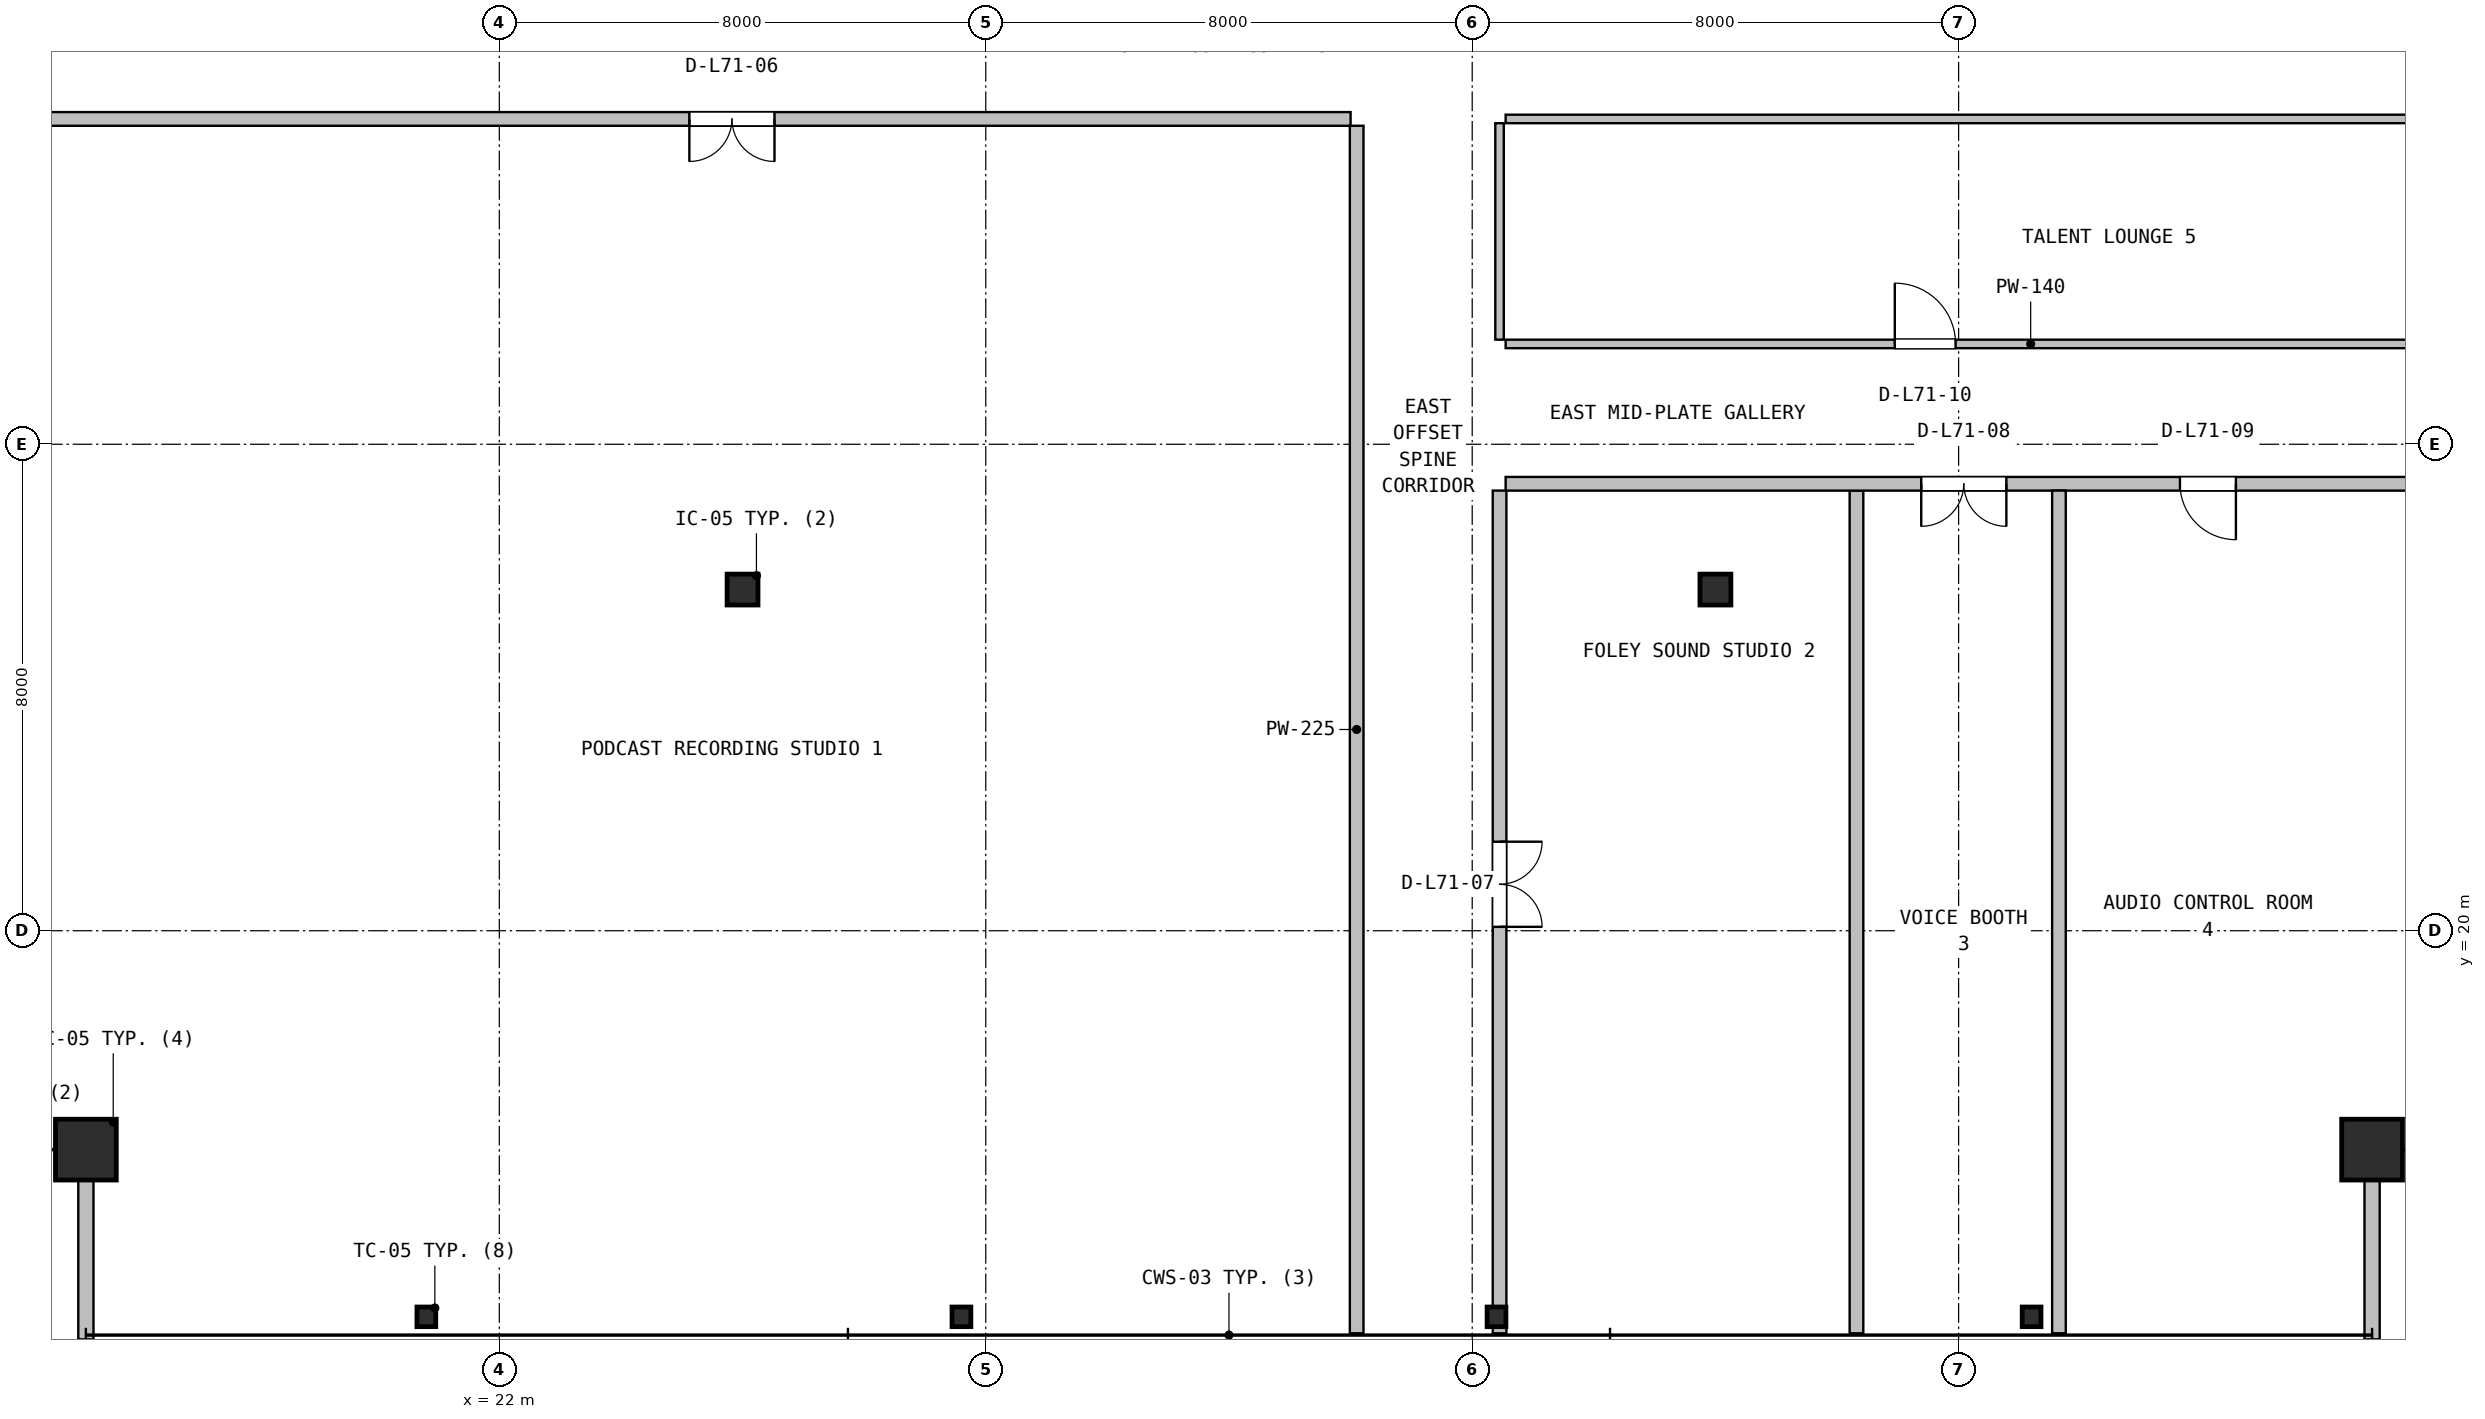
"""IFC4 building model, lengths in metres.
Left out: names, types, materials, properties, quantities, classifications, styles, units other than length and angle.
Written with IfcOpenShell. Run it as: python <this file> out.ifc"""

import sys

from ifc_helpers import new_model, si_unit, direction, frame, frame_2d, origin, origin_2d, place, context, subcontext, project, spatial, rectangle, hollow_rectangle, hollow_circle, i_section, extrude, source, transform, mapped, element, fill, save


model = new_model("IFC4")
c1 = context("Model", 3, precision=1e-05, world=origin(), true_north=direction((0.0, 1.0)))
c2 = subcontext(c1, "Body", "Model", "MODEL_VIEW")
j1 = project(units=[si_unit("LENGTHUNIT", "METRE"), si_unit("PLANEANGLEUNIT", "RADIAN")], contexts=[c1])
p1 = place(None, origin())
s1 = spatial("IfcSite", under=j1, at=p1, CompositionType="ELEMENT")
p2 = place(p1, origin())
s2 = spatial("IfcBuilding", under=s1, at=p2, CompositionType="ELEMENT")
p3 = place(p2, frame((0.0, 0.0, 285.0)))
s3 = spatial("IfcBuildingStorey", under=s2, at=p3, CompositionType="ELEMENT", Elevation=285.0)
m1 = source(origin(), c2, "Body", "SweptSolid", [
    extrude(hollow_rectangle(XDim=1.0, YDim=1.0, WallThickness=0.04, at=origin_2d()), origin(), (0.0, 0.0, 1.0), 3.8),
])
for number, where, z_axis, x_axis in (
    (1, (15.2, 16.4, 0.0), (0.0, 0.0, 1.0), (1.0, 0.0, 0.0)),
    (2, (52.8, 16.4, 0.0), (0.0, 0.0, 1.0), (1.0, 0.0, 0.0)),
):
    element("IfcColumn", number, at=place(p3, frame(where, z_axis=z_axis, x_axis=x_axis)), inside=s3, PredefinedType="COLUMN", context=c2, shape_type="MappedRepresentation", body=[
        mapped(m1, transform((0.0, 0.0, 0.0), x_axis=(1.0, 0.0, 0.0), y_axis=(0.0, 1.0, 0.0), z_axis=(0.0, 0.0, 1.0), scale=1.0)),
    ])
m2 = source(origin(), c2, "Body", "SweptSolid", [
    extrude(i_section(OverallWidth=0.309, OverallDepth=0.323, WebThickness=0.014, FlangeThickness=0.023, FilletRadius=0.015, at=origin_2d()), origin(), (0.0, 0.0, 1.0), 3.8),
])
for number, where, z_axis, x_axis in (
    (3, (20.8, 13.65, 0.0), (0.0, 0.0, 1.0), (1.0, 0.0, 0.0)),
    (4, (29.6, 13.65, 0.0), (0.0, 0.0, 1.0), (1.0, 0.0, 0.0)),
    (5, (38.4, 13.65, 0.0), (0.0, 0.0, 1.0), (1.0, 0.0, 0.0)),
    (6, (47.2, 13.65, 0.0), (0.0, 0.0, 1.0), (1.0, 0.0, 0.0)),
):
    element("IfcColumn", number, at=place(p3, frame(where, z_axis=z_axis, x_axis=x_axis)), inside=s3, PredefinedType="COLUMN", context=c2, shape_type="MappedRepresentation", body=[
        mapped(m2, transform((0.0, 0.0, 0.0), x_axis=(1.0, 0.0, 0.0), y_axis=(0.0, 1.0, 0.0), z_axis=(0.0, 0.0, 1.0), scale=1.0)),
    ])
m3 = source(origin(), c2, "Body", "SweptSolid", [
    extrude(hollow_circle(Radius=0.254, WallThickness=0.02, at=origin_2d()), origin(), (0.0, 0.0, 1.0), 3.8),
])
for number, where, z_axis, x_axis in (
    (7, (26.0, 25.61, 0.0), (0.0, 0.0, 1.0), (1.0, 0.0, 0.0)),
    (8, (42.0, 25.61, 0.0), (0.0, 0.0, 1.0), (1.0, 0.0, 0.0)),
):
    element("IfcColumn", number, at=place(p3, frame(where, z_axis=z_axis, x_axis=x_axis)), inside=s3, PredefinedType="COLUMN", context=c2, shape_type="MappedRepresentation", body=[
        mapped(m3, transform((0.0, 0.0, 0.0), x_axis=(1.0, 0.0, 0.0), y_axis=(0.0, 1.0, 0.0), z_axis=(0.0, 0.0, 1.0), scale=1.0)),
    ])
for number, where, z_axis, x_axis in (
    (9, (15.2, 13.28, 0.0), (0.0, 0.0, 1.0), (0.0, 1.0, 0.0)),
    (10, (52.8, 13.28, 0.0), (0.0, 0.0, 1.0), (0.0, 1.0, 0.0)),
):
    element("IfcWall", number, at=place(p3, frame(where, z_axis=z_axis, x_axis=x_axis)), inside=s3, PredefinedType="SOLIDWALL", context=c2, shape_type="SweptSolid", body=[
        extrude(rectangle(XDim=3.2, YDim=0.25, at=frame_2d((1.6, 0.0))), origin(), (0.0, 0.0, 1.0), 3.171),
    ])
p4 = place(p3, frame((36.1, 13.38, 0.0), z_axis=(0.0, 0.0, 1.0), x_axis=(0.0, 1.0, 0.0)))
e11 = element("IfcWall", 11, at=p4, inside=s3, PredefinedType="PARTITIONING", context=c2, shape_type="SweptSolid", body=[
    extrude(rectangle(XDim=19.858, YDim=0.225, at=frame_2d((9.929, 0.0))), origin(), (0.0, 0.0, 1.0), 2.981),
])
p5 = place(p3, frame((12.18, 33.35, 0.0), z_axis=(0.0, 0.0, 1.0), x_axis=(1.0, 0.0, 0.0)))
e12 = element("IfcWall", 12, at=p5, inside=s3, PredefinedType="PARTITIONING", context=c2, shape_type="SweptSolid", body=[
    extrude(rectangle(XDim=23.82, YDim=0.225, at=frame_2d((11.91, 0.0))), origin(), (0.0, 0.0, 1.0), 2.981),
])
p6 = place(p5, frame((12.945, 0.0, 0.0)))
e13 = element("IfcOpeningElement", 13, at=p6, cuts=e12, PredefinedType="OPENING", context=c2, shape_type="SweptSolid", body=[
    extrude(rectangle(XDim=1.4, YDim=2.12, at=frame_2d((0.7, 1.06))), frame((0.0, 0.123, 0.0), z_axis=(0.0, -1.0, 0.0), x_axis=(1.0, 0.0, 0.0)), (0.0, 0.0, 1.0), 0.245),
])
p7 = place(p3, frame((44.32, 13.38, 0.0), z_axis=(0.0, 0.0, 1.0), x_axis=(0.0, 1.0, 0.0)))
e14 = element("IfcWall", 14, at=p7, inside=s3, PredefinedType="PARTITIONING", context=c2, shape_type="SweptSolid", body=[
    extrude(rectangle(XDim=13.858, YDim=0.225, at=frame_2d((6.929, 0.0))), origin(), (0.0, 0.0, 1.0), 3.171),
])
p8 = place(p3, frame((38.55, 27.35, 0.0), z_axis=(0.0, 0.0, 1.0), x_axis=(1.0, 0.0, 0.0)))
e15 = element("IfcWall", 15, at=p8, inside=s3, PredefinedType="PARTITIONING", context=c2, shape_type="SweptSolid", body=[
    extrude(rectangle(XDim=17.27, YDim=0.225, at=frame_2d((8.635, 0.0))), origin(), (0.0, 0.0, 1.0), 2.981),
])
p9 = place(p8, frame((6.835, 0.0, 0.0)))
e16 = element("IfcOpeningElement", 16, at=p9, cuts=e15, PredefinedType="OPENING", context=c2, shape_type="SweptSolid", body=[
    extrude(rectangle(XDim=1.4, YDim=2.12, at=frame_2d((0.7, 1.06))), frame((0.0, 0.123, 0.0), z_axis=(0.0, -1.0, 0.0), x_axis=(1.0, 0.0, 0.0)), (0.0, 0.0, 1.0), 0.245),
])
p10 = place(p8, frame((11.09, 0.0, 0.0)))
e17 = element("IfcOpeningElement", 17, at=p10, cuts=e15, PredefinedType="OPENING", context=c2, shape_type="SweptSolid", body=[
    extrude(rectangle(XDim=0.92, YDim=2.08, at=frame_2d((0.46, 1.04))), frame((0.0, 0.123, 0.0), z_axis=(0.0, -1.0, 0.0), x_axis=(1.0, 0.0, 0.0)), (0.0, 0.0, 1.0), 0.245),
])
p11 = place(p3, frame((38.45, 13.38, 0.0), z_axis=(0.0, 0.0, 1.0), x_axis=(0.0, 1.0, 0.0)))
e18 = element("IfcWall", 18, at=p11, inside=s3, PredefinedType="PARTITIONING", context=c2, shape_type="SweptSolid", body=[
    extrude(rectangle(XDim=13.858, YDim=0.225, at=frame_2d((6.929, 0.0))), origin(), (0.0, 0.0, 1.0), 2.981),
])
p12 = place(p11, frame((6.684, 0.0, 0.0)))
e19 = element("IfcOpeningElement", 19, at=p12, cuts=e18, PredefinedType="OPENING", context=c2, shape_type="SweptSolid", body=[
    extrude(rectangle(XDim=1.4, YDim=2.12, at=frame_2d((0.7, 1.06))), frame((0.0, 0.123, 0.0), z_axis=(0.0, -1.0, 0.0), x_axis=(1.0, 0.0, 0.0)), (0.0, 0.0, 1.0), 0.245),
])
p13 = place(p3, frame((47.65, 13.38, 0.0), z_axis=(0.0, 0.0, 1.0), x_axis=(0.0, 1.0, 0.0)))
e20 = element("IfcWall", 20, at=p13, inside=s3, PredefinedType="PARTITIONING", context=c2, shape_type="SweptSolid", body=[
    extrude(rectangle(XDim=13.858, YDim=0.225, at=frame_2d((6.929, 0.0))), origin(), (0.0, 0.0, 1.0), 3.171),
])
p14 = place(p3, frame((38.55, 29.65, 0.0), z_axis=(0.0, 0.0, 1.0), x_axis=(1.0, 0.0, 0.0)))
e21 = element("IfcWall", 21, at=p14, inside=s3, PredefinedType="PARTITIONING", context=c2, shape_type="SweptSolid", body=[
    extrude(rectangle(XDim=17.27, YDim=0.14, at=frame_2d((8.635, 0.0))), origin(), (0.0, 0.0, 1.0), 2.981),
])
p15 = place(p14, frame((6.4, 0.0, 0.0)))
e22 = element("IfcOpeningElement", 22, at=p15, cuts=e21, PredefinedType="OPENING", context=c2, shape_type="SweptSolid", body=[
    extrude(rectangle(XDim=1.0, YDim=2.1, at=frame_2d((0.5, 1.05))), frame((0.0, 0.08, 0.0), z_axis=(0.0, -1.0, 0.0), x_axis=(1.0, 0.0, 0.0)), (0.0, 0.0, 1.0), 0.16),
])
p16 = place(p3, frame((38.55, 33.35, 0.0), z_axis=(0.0, 0.0, 1.0), x_axis=(1.0, 0.0, 0.0)))
e23 = element("IfcWall", 23, at=p16, inside=s3, PredefinedType="PARTITIONING", context=c2, shape_type="SweptSolid", body=[
    extrude(rectangle(XDim=17.27, YDim=0.14, at=frame_2d((8.635, 0.0))), origin(), (0.0, 0.0, 1.0), 2.981),
])
p17 = place(p3, frame((38.45, 29.72, 0.0), z_axis=(0.0, 0.0, 1.0), x_axis=(0.0, 1.0, 0.0)))
e24 = element("IfcWall", 24, at=p17, inside=s3, PredefinedType="PARTITIONING", context=c2, shape_type="SweptSolid", body=[
    extrude(rectangle(XDim=3.56, YDim=0.14, at=frame_2d((1.78, 0.0))), origin(), (0.0, 0.0, 1.0), 3.53),
])
m4 = source(origin(), c2, "Body", "SweptSolid", [
    extrude(rectangle(XDim=1.4, YDim=2.12, at=frame_2d((0.7, 1.06))), frame((0.0, 0.025, 0.0), z_axis=(0.0, -1.0, 0.0), x_axis=(1.0, 0.0, 0.0)), (0.0, 0.0, 1.0), 0.05),
])
p18 = place(p6, frame((1.4, 0.0, 0.0), z_axis=(0.0, 0.0, 1.0), x_axis=(-1.0, 0.0, 0.0)))
e25 = element("IfcDoor", 25, at=p18, inside=s3, OperationType="DOUBLE_DOOR_SINGLE_SWING", PredefinedType="DOOR", context=c2, shape_type="MappedRepresentation", body=[
    mapped(m4, transform((0.0, 0.0, 0.0), x_axis=(1.0, 0.0, 0.0), y_axis=(0.0, 1.0, 0.0), z_axis=(0.0, 0.0, 1.0), scale=1.0)),
])
fill(e13, e25)
p19 = place(p12, frame((1.4, 0.0, 0.0), z_axis=(0.0, 0.0, 1.0), x_axis=(-1.0, 0.0, 0.0)))
e26 = element("IfcDoor", 26, at=p19, inside=s3, OperationType="DOUBLE_DOOR_SINGLE_SWING", PredefinedType="DOOR", context=c2, shape_type="MappedRepresentation", body=[
    mapped(m4, transform((0.0, 0.0, 0.0), x_axis=(1.0, 0.0, 0.0), y_axis=(0.0, 1.0, 0.0), z_axis=(0.0, 0.0, 1.0), scale=1.0)),
])
fill(e19, e26)
p20 = place(p9, frame((1.4, 0.0, 0.0), z_axis=(0.0, 0.0, 1.0), x_axis=(-1.0, 0.0, 0.0)))
e27 = element("IfcDoor", 27, at=p20, inside=s3, OperationType="DOUBLE_DOOR_SINGLE_SWING", PredefinedType="DOOR", context=c2, shape_type="MappedRepresentation", body=[
    mapped(m4, transform((0.0, 0.0, 0.0), x_axis=(1.0, 0.0, 0.0), y_axis=(0.0, 1.0, 0.0), z_axis=(0.0, 0.0, 1.0), scale=1.0)),
])
fill(e16, e27)
m5 = source(origin(), c2, "Body", "SweptSolid", [
    extrude(rectangle(XDim=0.92, YDim=2.08, at=frame_2d((0.46, 1.04))), frame((0.0, 0.025, 0.0), z_axis=(0.0, -1.0, 0.0), x_axis=(1.0, 0.0, 0.0)), (0.0, 0.0, 1.0), 0.05),
])
p21 = place(p10, frame((0.92, 0.0, 0.0), z_axis=(0.0, 0.0, 1.0), x_axis=(-1.0, 0.0, 0.0)))
e28 = element("IfcDoor", 28, at=p21, inside=s3, OperationType="SINGLE_SWING_RIGHT", PredefinedType="DOOR", context=c2, shape_type="MappedRepresentation", body=[
    mapped(m5, transform((0.0, 0.0, 0.0), x_axis=(1.0, 0.0, 0.0), y_axis=(0.0, 1.0, 0.0), z_axis=(0.0, 0.0, 1.0), scale=1.0)),
])
fill(e17, e28)
m6 = source(origin(), c2, "Body", "SweptSolid", [
    extrude(rectangle(XDim=1.0, YDim=2.1, at=frame_2d((0.5, 1.05))), frame((0.0, 0.025, 0.0), z_axis=(0.0, -1.0, 0.0), x_axis=(1.0, 0.0, 0.0)), (0.0, 0.0, 1.0), 0.05),
])
p22 = place(p15, origin())
e29 = element("IfcDoor", 29, at=p22, inside=s3, OperationType="SINGLE_SWING_LEFT", PredefinedType="DOOR", context=c2, shape_type="MappedRepresentation", body=[
    mapped(m6, transform((0.0, 0.0, 0.0), x_axis=(1.0, 0.0, 0.0), y_axis=(0.0, 1.0, 0.0), z_axis=(0.0, 0.0, 1.0), scale=1.0)),
])
fill(e22, e29)
save(model, sys.argv[1])
